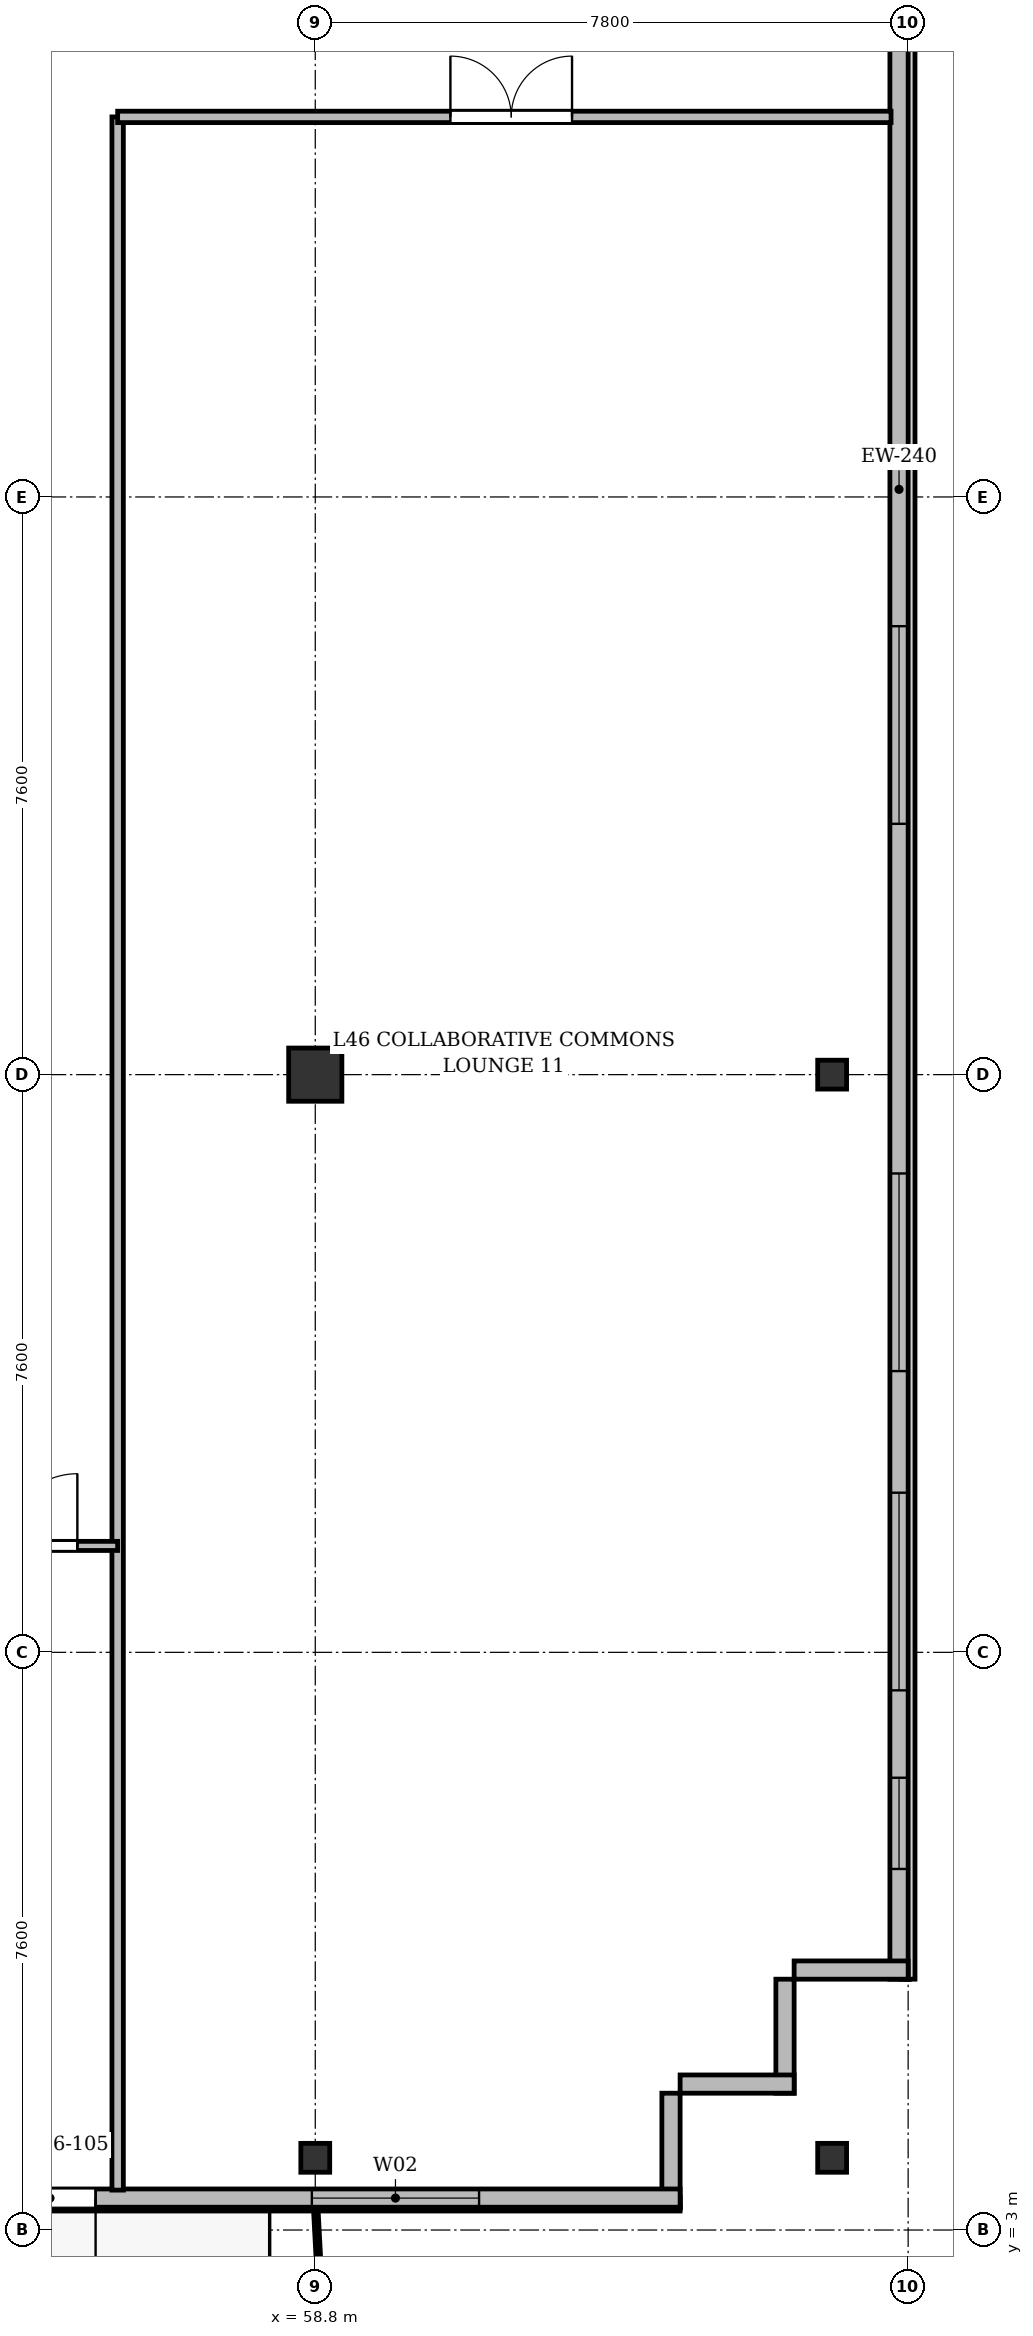
"""IFC4 building model, lengths in metres.
Left out: names, types, materials, properties, quantities, classifications, styles, units other than length and angle.
Written with IfcOpenShell. Run it as: python <this file> out.ifc"""

import sys

from ifc_helpers import new_model, si_unit, direction, frame, frame_2d, origin, origin_2d, place, context, subcontext, project, spatial, rectangle, i_section, extrude, source, transform, mapped, element, fill, save


model = new_model("IFC4")
c1 = context("Model", 3, precision=1e-05, world=origin(), true_north=direction((0.0, 1.0)))
c2 = subcontext(c1, "Body", "Model", "MODEL_VIEW")
j1 = project(units=[si_unit("LENGTHUNIT", "METRE"), si_unit("PLANEANGLEUNIT", "RADIAN")], contexts=[c1])
p1 = place(None, origin())
s1 = spatial("IfcSite", under=j1, at=p1, CompositionType="ELEMENT")
p2 = place(p1, origin())
s2 = spatial("IfcBuilding", under=s1, at=p2, CompositionType="ELEMENT")
p3 = place(p2, frame((0.0, 0.0, 175.3)))
s3 = spatial("IfcBuildingStorey", under=s2, at=p3, CompositionType="ELEMENT", Elevation=175.3)
m1 = source(origin(), c2, "Body", "SweptSolid", [
    extrude(i_section(OverallWidth=0.38, OverallDepth=0.38, WebThickness=0.02, FlangeThickness=0.03, at=origin_2d()), origin(), (0.0, 0.0, 1.0), 3.6),
])
p4 = place(p3, frame((58.8, 3.95, 0.0), z_axis=(0.0, 0.0, 1.0), x_axis=(1.0, 0.0, 0.0)))
e1 = element("IfcColumn", 1, at=p4, inside=s3, PredefinedType="COLUMN", context=c2, shape_type="MappedRepresentation", body=[
    mapped(m1, transform((0.0, 0.0, 0.0), x_axis=(1.0, 0.0, 0.0), y_axis=(0.0, 1.0, 0.0), z_axis=(0.0, 0.0, 1.0), scale=1.0)),
])
m2 = source(origin(), c2, "Body", "SweptSolid", [
    extrude(rectangle(XDim=0.7, YDim=0.7, at=origin_2d()), origin(), (0.0, 0.0, 1.0), 3.6),
])
p5 = place(p3, frame((58.8, 18.2, 0.0), z_axis=(0.0, 0.0, 1.0), x_axis=(1.0, 0.0, 0.0)))
e2 = element("IfcColumn", 2, at=p5, inside=s3, PredefinedType="COLUMN", context=c2, shape_type="MappedRepresentation", body=[
    mapped(m2, transform((0.0, 0.0, 0.0), x_axis=(1.0, 0.0, 0.0), y_axis=(0.0, 1.0, 0.0), z_axis=(0.0, 0.0, 1.0), scale=1.0)),
])
for number, where, z_axis, x_axis in (
    (3, (65.6, 3.95, 0.0), (0.0, 0.0, 1.0), (1.0, 0.0, 0.0)),
    (4, (65.6, 18.2, 0.0), (0.0, 0.0, 1.0), (1.0, 0.0, 0.0)),
):
    element("IfcColumn", number, at=place(p3, frame(where, z_axis=z_axis, x_axis=x_axis)), inside=s3, PredefinedType="COLUMN", context=c2, shape_type="MappedRepresentation", body=[
        mapped(m1, transform((0.0, 0.0, 0.0), x_axis=(1.0, 0.0, 0.0), y_axis=(0.0, 1.0, 0.0), z_axis=(0.0, 0.0, 1.0), scale=1.0)),
    ])
p6 = place(p3, frame((66.48, 45.5, 0.0), z_axis=(0.0, 0.0, 1.0), x_axis=(0.0, -1.0, 0.0)))
e5 = element("IfcWall", 5, at=p6, inside=s3, PredefinedType="SOLIDWALL", context=c2, shape_type="SweptSolid", body=[
    extrude(rectangle(XDim=39.2, YDim=0.24, at=frame_2d((19.6, 0.0))), origin(), (0.0, 0.0, 1.0), 3.35),
])
p7 = place(p6, frame((36.55, 0.0, 0.92)))
e6 = element("IfcOpeningElement", 6, at=p7, cuts=e5, PredefinedType="OPENING", context=c2, shape_type="SweptSolid", body=[
    extrude(rectangle(XDim=1.2, YDim=1.65, at=frame_2d((0.6, 0.825))), frame((0.0, 0.13, 0.0), z_axis=(0.0, -1.0, 0.0), x_axis=(1.0, 0.0, 0.0)), (0.0, 0.0, 1.0), 0.26),
])
p8 = place(p6, frame((32.8, 0.0, 0.92)))
e7 = element("IfcOpeningElement", 7, at=p8, cuts=e5, PredefinedType="OPENING", context=c2, shape_type="SweptSolid", body=[
    extrude(rectangle(XDim=2.6, YDim=1.9, at=frame_2d((1.3, 0.95))), frame((0.0, 0.13, 0.0), z_axis=(0.0, -1.0, 0.0), x_axis=(1.0, 0.0, 0.0)), (0.0, 0.0, 1.0), 0.26),
])
p9 = place(p6, frame((28.6, 0.0, 0.92)))
e8 = element("IfcOpeningElement", 8, at=p9, cuts=e5, PredefinedType="OPENING", context=c2, shape_type="SweptSolid", body=[
    extrude(rectangle(XDim=2.6, YDim=1.9, at=frame_2d((1.3, 0.95))), frame((0.0, 0.13, 0.0), z_axis=(0.0, -1.0, 0.0), x_axis=(1.0, 0.0, 0.0)), (0.0, 0.0, 1.0), 0.26),
])
p10 = place(p6, frame((21.4, 0.0, 0.92)))
e9 = element("IfcOpeningElement", 9, at=p10, cuts=e5, PredefinedType="OPENING", context=c2, shape_type="SweptSolid", body=[
    extrude(rectangle(XDim=2.6, YDim=1.9, at=frame_2d((1.3, 0.95))), frame((0.0, 0.13, 0.0), z_axis=(0.0, -1.0, 0.0), x_axis=(1.0, 0.0, 0.0)), (0.0, 0.0, 1.0), 0.26),
])
p11 = place(p6, frame((7.4, 0.0, 0.92)))
e10 = element("IfcOpeningElement", 10, at=p11, cuts=e5, PredefinedType="OPENING", context=c2, shape_type="SweptSolid", body=[
    extrude(rectangle(XDim=2.6, YDim=1.9, at=frame_2d((1.3, 0.95))), frame((0.0, 0.13, 0.0), z_axis=(0.0, -1.0, 0.0), x_axis=(1.0, 0.0, 0.0)), (0.0, 0.0, 1.0), 0.26),
])
p12 = place(p6, frame((4.5, 0.0, 0.92)))
e11 = element("IfcOpeningElement", 11, at=p12, cuts=e5, PredefinedType="OPENING", context=c2, shape_type="SweptSolid", body=[
    extrude(rectangle(XDim=1.2, YDim=1.65, at=frame_2d((0.6, 0.825))), frame((0.0, 0.13, 0.0), z_axis=(0.0, -1.0, 0.0), x_axis=(1.0, 0.0, 0.0)), (0.0, 0.0, 1.0), 0.26),
])
p13 = place(p6, frame((1.15, 0.0, 0.92)))
e12 = element("IfcOpeningElement", 12, at=p13, cuts=e5, PredefinedType="OPENING", context=c2, shape_type="SweptSolid", body=[
    extrude(rectangle(XDim=1.2, YDim=1.65, at=frame_2d((0.6, 0.825))), frame((0.0, 0.13, 0.0), z_axis=(0.0, -1.0, 0.0), x_axis=(1.0, 0.0, 0.0)), (0.0, 0.0, 1.0), 0.26),
])
p14 = place(p3, frame((66.6, 6.42, 0.0), z_axis=(0.0, 0.0, 1.0), x_axis=(-1.0, 0.0, 0.0)))
e13 = element("IfcWall", 13, at=p14, inside=s3, PredefinedType="SOLIDWALL", context=c2, shape_type="SweptSolid", body=[
    extrude(rectangle(XDim=1.5, YDim=0.24, at=frame_2d((0.75, 0.0))), origin(), (0.0, 0.0, 1.0), 2.85),
])
for number, where, z_axis, x_axis in (
    (14, (64.98, 6.3, 0.0), (0.0, 0.0, 1.0), (0.0, -1.0, 0.0)),
    (15, (65.1, 4.92, 0.0), (0.0, 0.0, 1.0), (-1.0, 0.0, 0.0)),
):
    element("IfcWall", number, at=place(p3, frame(where, z_axis=z_axis, x_axis=x_axis)), inside=s3, PredefinedType="SOLIDWALL", context=c2, shape_type="SweptSolid", body=[
        extrude(rectangle(XDim=1.5, YDim=0.24, at=frame_2d((0.75, 0.0))), origin(), (0.0, 0.0, 1.0), 3.35),
    ])
p15 = place(p3, frame((63.48, 4.8, 0.0), z_axis=(0.0, 0.0, 1.0), x_axis=(0.0, -1.0, 0.0)))
e16 = element("IfcWall", 16, at=p15, inside=s3, PredefinedType="SOLIDWALL", context=c2, shape_type="SweptSolid", body=[
    extrude(rectangle(XDim=1.5, YDim=0.24, at=frame_2d((0.75, 0.0))), origin(), (0.0, 0.0, 1.0), 2.75),
])
p16 = place(p3, frame((63.6, 3.42, 0.0), z_axis=(0.0, 0.0, 1.0), x_axis=(-1.0, 0.0, 0.0)))
e17 = element("IfcWall", 17, at=p16, inside=s3, PredefinedType="SOLIDWALL", context=c2, shape_type="SweptSolid", body=[
    extrude(rectangle(XDim=34.0, YDim=0.24, at=frame_2d((17.0, 0.0))), origin(), (0.0, 0.0, 1.0), 3.35),
])
p17 = place(p16, frame((2.645, 0.0, 0.9)))
e18 = element("IfcOpeningElement", 18, at=p17, cuts=e17, PredefinedType="OPENING", context=c2, shape_type="SweptSolid", body=[
    extrude(rectangle(XDim=2.2, YDim=1.8, at=frame_2d((1.1, 0.9))), frame((0.0, 0.13, 0.0), z_axis=(0.0, -1.0, 0.0), x_axis=(1.0, 0.0, 0.0)), (0.0, 0.0, 1.0), 0.26),
])
p18 = place(p16, frame((7.69, 0.0, 0.0)))
e19 = element("IfcOpeningElement", 19, at=p18, cuts=e17, PredefinedType="OPENING", context=c2, shape_type="SweptSolid", body=[
    extrude(rectangle(XDim=1.2, YDim=2.2, at=frame_2d((0.6, 1.1))), frame((0.0, 0.13, 0.0), z_axis=(0.0, -1.0, 0.0), x_axis=(1.0, 0.0, 0.0)), (0.0, 0.0, 1.0), 0.26),
])
p19 = place(p16, frame((10.0, 0.0, 0.9)))
e20 = element("IfcOpeningElement", 20, at=p19, cuts=e17, PredefinedType="OPENING", context=c2, shape_type="SweptSolid", body=[
    extrude(rectangle(XDim=2.0, YDim=1.95, at=frame_2d((1.0, 0.975))), frame((0.0, 0.13, 0.0), z_axis=(0.0, -1.0, 0.0), x_axis=(1.0, 0.0, 0.0)), (0.0, 0.0, 1.0), 0.26),
])
p20 = place(p16, frame((13.575, 0.0, 0.9)))
e21 = element("IfcOpeningElement", 21, at=p20, cuts=e17, PredefinedType="OPENING", context=c2, shape_type="SweptSolid", body=[
    extrude(rectangle(XDim=1.65, YDim=1.85, at=frame_2d((0.825, 0.925))), frame((0.0, 0.13, 0.0), z_axis=(0.0, -1.0, 0.0), x_axis=(1.0, 0.0, 0.0)), (0.0, 0.0, 1.0), 0.26),
])
p21 = place(p16, frame((17.1, 0.0, 0.9)))
e22 = element("IfcOpeningElement", 22, at=p21, cuts=e17, PredefinedType="OPENING", context=c2, shape_type="SweptSolid", body=[
    extrude(rectangle(XDim=1.8, YDim=1.8, at=frame_2d((0.9, 0.9))), frame((0.0, 0.13, 0.0), z_axis=(0.0, -1.0, 0.0), x_axis=(1.0, 0.0, 0.0)), (0.0, 0.0, 1.0), 0.26),
])
p22 = place(p16, frame((21.5, 0.0, 0.9)))
e23 = element("IfcOpeningElement", 23, at=p22, cuts=e17, PredefinedType="OPENING", context=c2, shape_type="SweptSolid", body=[
    extrude(rectangle(XDim=2.2, YDim=1.8, at=frame_2d((1.1, 0.9))), frame((0.0, 0.13, 0.0), z_axis=(0.0, -1.0, 0.0), x_axis=(1.0, 0.0, 0.0)), (0.0, 0.0, 1.0), 0.26),
])
p23 = place(p16, frame((28.45, 0.0, 0.9)))
e24 = element("IfcOpeningElement", 24, at=p23, cuts=e17, PredefinedType="OPENING", context=c2, shape_type="SweptSolid", body=[
    extrude(rectangle(XDim=1.5, YDim=1.75, at=frame_2d((0.75, 0.875))), frame((0.0, 0.13, 0.0), z_axis=(0.0, -1.0, 0.0), x_axis=(1.0, 0.0, 0.0)), (0.0, 0.0, 1.0), 0.26),
])
p24 = place(p3, frame((56.2, 3.525, 0.0), z_axis=(0.0, 0.0, 1.0), x_axis=(0.0, 1.0, 0.0)))
e25 = element("IfcWall", 25, at=p24, inside=s3, PredefinedType="PARTITIONING", context=c2, shape_type="SweptSolid", body=[
    extrude(rectangle(XDim=27.275, YDim=0.15, at=frame_2d((13.638, 0.0))), origin(), (0.0, 0.0, 1.0), 2.75),
])
p25 = place(p3, frame((54.2, 12.0, 0.0), z_axis=(0.0, 0.0, 1.0), x_axis=(1.0, 0.0, 0.0)))
e26 = element("IfcWall", 26, at=p25, inside=s3, PredefinedType="PARTITIONING", context=c2, shape_type="SweptSolid", body=[
    extrude(rectangle(XDim=2.0, YDim=0.12, at=frame_2d((1.0, 0.0))), origin(), (0.0, 0.0, 1.0), 3.35),
])
p26 = place(p25, frame((0.52, 0.0, 0.0)))
e27 = element("IfcOpeningElement", 27, at=p26, cuts=e26, PredefinedType="OPENING", context=c2, shape_type="SweptSolid", body=[
    extrude(rectangle(XDim=0.95, YDim=2.15, at=frame_2d((0.475, 1.075))), frame((0.0, 0.07, 0.0), z_axis=(0.0, -1.0, 0.0), x_axis=(1.0, 0.0, 0.0)), (0.0, 0.0, 1.0), 0.14),
])
p27 = place(p3, frame((56.2, 30.8, 0.0), z_axis=(0.0, 0.0, 1.0), x_axis=(1.0, 0.0, 0.0)))
e28 = element("IfcWall", 28, at=p27, inside=s3, PredefinedType="PARTITIONING", context=c2, shape_type="SweptSolid", body=[
    extrude(rectangle(XDim=10.175, YDim=0.15, at=frame_2d((5.087, 0.0))), origin(), (0.0, 0.0, 1.0), 2.85),
])
p28 = place(p27, frame((4.378, 0.0, 0.0)))
e29 = element("IfcOpeningElement", 29, at=p28, cuts=e28, PredefinedType="OPENING", context=c2, shape_type="SweptSolid", body=[
    extrude(rectangle(XDim=1.6, YDim=2.2, at=frame_2d((0.8, 1.1))), frame((0.0, 0.085, 0.0), z_axis=(0.0, -1.0, 0.0), x_axis=(1.0, 0.0, 0.0)), (0.0, 0.0, 1.0), 0.17),
])
m3 = source(origin(), c2, "Body", "SweptSolid", [
    extrude(rectangle(XDim=1.2, YDim=1.65, at=frame_2d((0.6, 0.825))), frame((0.0, 0.03, 0.0), z_axis=(0.0, -1.0, 0.0), x_axis=(1.0, 0.0, 0.0)), (0.0, 0.0, 1.0), 0.06),
])
p29 = place(p7, origin())
e30 = element("IfcWindow", 30, at=p29, inside=s3, PartitioningType="SINGLE_PANEL", PredefinedType="WINDOW", context=c2, shape_type="MappedRepresentation", body=[
    mapped(m3, transform((0.0, 0.0, 0.0), x_axis=(1.0, 0.0, 0.0), y_axis=(0.0, 1.0, 0.0), z_axis=(0.0, 0.0, 1.0), scale=1.0)),
])
fill(e6, e30)
m4 = source(origin(), c2, "Body", "SweptSolid", [
    extrude(rectangle(XDim=2.6, YDim=1.9, at=frame_2d((1.3, 0.95))), frame((0.0, 0.03, 0.0), z_axis=(0.0, -1.0, 0.0), x_axis=(1.0, 0.0, 0.0)), (0.0, 0.0, 1.0), 0.06),
])
p30 = place(p8, origin())
e31 = element("IfcWindow", 31, at=p30, inside=s3, PartitioningType="SINGLE_PANEL", PredefinedType="WINDOW", context=c2, shape_type="MappedRepresentation", body=[
    mapped(m4, transform((0.0, 0.0, 0.0), x_axis=(1.0, 0.0, 0.0), y_axis=(0.0, 1.0, 0.0), z_axis=(0.0, 0.0, 1.0), scale=1.0)),
])
fill(e7, e31)
p31 = place(p9, origin())
e32 = element("IfcWindow", 32, at=p31, inside=s3, PartitioningType="SINGLE_PANEL", PredefinedType="WINDOW", context=c2, shape_type="MappedRepresentation", body=[
    mapped(m4, transform((0.0, 0.0, 0.0), x_axis=(1.0, 0.0, 0.0), y_axis=(0.0, 1.0, 0.0), z_axis=(0.0, 0.0, 1.0), scale=1.0)),
])
fill(e8, e32)
p32 = place(p10, origin())
e33 = element("IfcWindow", 33, at=p32, inside=s3, PartitioningType="SINGLE_PANEL", PredefinedType="WINDOW", context=c2, shape_type="MappedRepresentation", body=[
    mapped(m4, transform((0.0, 0.0, 0.0), x_axis=(1.0, 0.0, 0.0), y_axis=(0.0, 1.0, 0.0), z_axis=(0.0, 0.0, 1.0), scale=1.0)),
])
fill(e9, e33)
m5 = source(origin(), c2, "Body", "SweptSolid", [
    extrude(rectangle(XDim=2.2, YDim=1.8, at=frame_2d((1.1, 0.9))), frame((0.0, 0.03, 0.0), z_axis=(0.0, -1.0, 0.0), x_axis=(1.0, 0.0, 0.0)), (0.0, 0.0, 1.0), 0.06),
])
p33 = place(p17, origin())
e34 = element("IfcWindow", 34, at=p33, inside=s3, PartitioningType="SINGLE_PANEL", PredefinedType="WINDOW", context=c2, shape_type="MappedRepresentation", body=[
    mapped(m5, transform((0.0, 0.0, 0.0), x_axis=(1.0, 0.0, 0.0), y_axis=(0.0, 1.0, 0.0), z_axis=(0.0, 0.0, 1.0), scale=1.0)),
])
fill(e18, e34)
m6 = source(origin(), c2, "Body", "SweptSolid", [
    extrude(rectangle(XDim=1.2, YDim=2.2, at=frame_2d((0.6, 1.1))), frame((0.0, 0.025, 0.0), z_axis=(0.0, -1.0, 0.0), x_axis=(1.0, 0.0, 0.0)), (0.0, 0.0, 1.0), 0.05),
])
p34 = place(p18, origin())
e35 = element("IfcDoor", 35, at=p34, inside=s3, OperationType="SINGLE_SWING_LEFT", PredefinedType="DOOR", context=c2, shape_type="MappedRepresentation", body=[
    mapped(m6, transform((0.0, 0.0, 0.0), x_axis=(1.0, 0.0, 0.0), y_axis=(0.0, 1.0, 0.0), z_axis=(0.0, 0.0, 1.0), scale=1.0)),
])
fill(e19, e35)
m7 = source(origin(), c2, "Body", "SweptSolid", [
    extrude(rectangle(XDim=0.95, YDim=2.15, at=frame_2d((0.475, 1.075))), frame((0.0, 0.025, 0.0), z_axis=(0.0, -1.0, 0.0), x_axis=(1.0, 0.0, 0.0)), (0.0, 0.0, 1.0), 0.05),
])
p35 = place(p26, origin())
e36 = element("IfcDoor", 36, at=p35, inside=s3, OperationType="SINGLE_SWING_RIGHT", PredefinedType="DOOR", context=c2, shape_type="MappedRepresentation", body=[
    mapped(m7, transform((0.0, 0.0, 0.0), x_axis=(1.0, 0.0, 0.0), y_axis=(0.0, 1.0, 0.0), z_axis=(0.0, 0.0, 1.0), scale=1.0)),
])
fill(e27, e36)
m8 = source(origin(), c2, "Body", "SweptSolid", [
    extrude(rectangle(XDim=1.6, YDim=2.2, at=frame_2d((0.8, 1.1))), frame((0.0, 0.025, 0.0), z_axis=(0.0, -1.0, 0.0), x_axis=(1.0, 0.0, 0.0)), (0.0, 0.0, 1.0), 0.05),
])
p36 = place(p28, origin())
e37 = element("IfcDoor", 37, at=p36, inside=s3, OperationType="DOUBLE_DOOR_SINGLE_SWING", PredefinedType="DOOR", context=c2, shape_type="MappedRepresentation", body=[
    mapped(m8, transform((0.0, 0.0, 0.0), x_axis=(1.0, 0.0, 0.0), y_axis=(0.0, 1.0, 0.0), z_axis=(0.0, 0.0, 1.0), scale=1.0)),
])
fill(e29, e37)
save(model, sys.argv[1])
